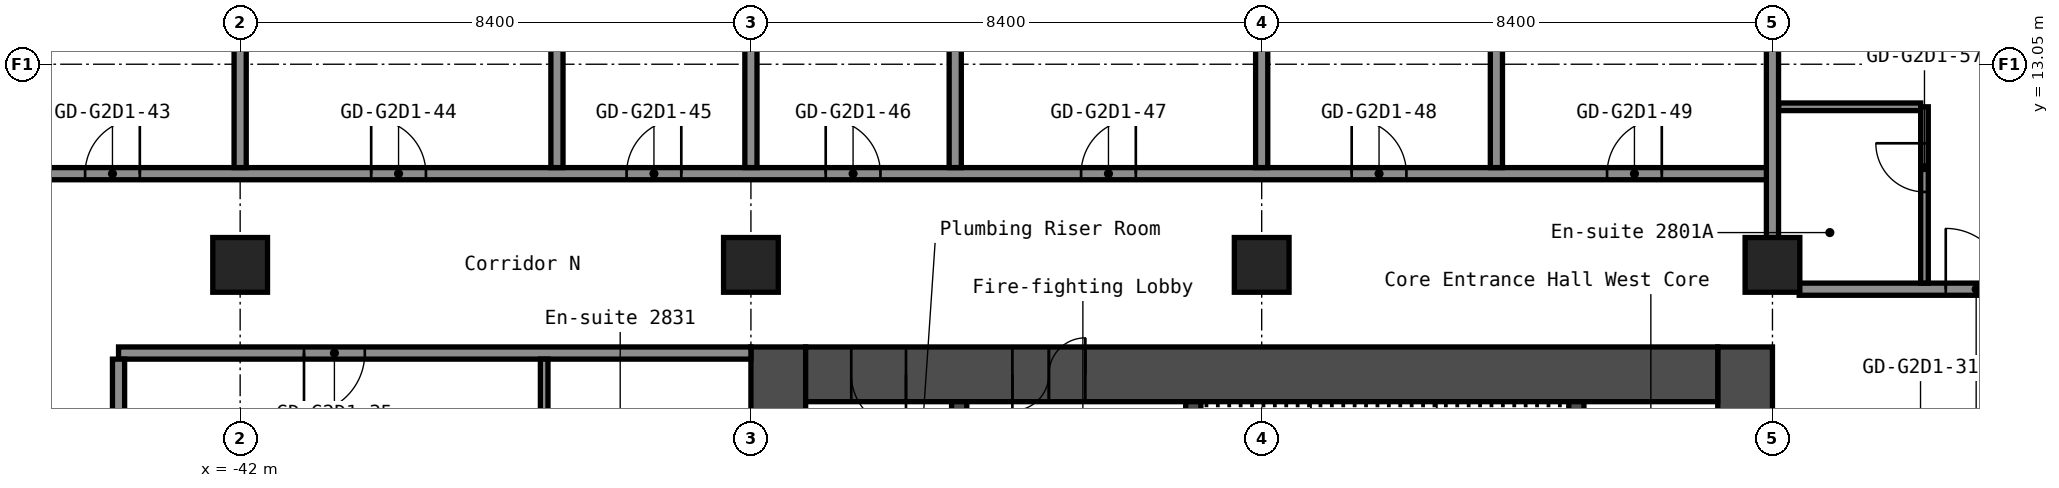
"""IFC4 building model, lengths in metres.
Left out: names, types, materials, properties, quantities, classifications, styles, units other than length and angle.
Written with IfcOpenShell. Run it as: python <this file> out.ifc"""

import sys

from ifc_helpers import new_model, si_unit, direction, frame, frame_2d, origin, origin_2d, place, context, subcontext, project, spatial, rectangle, hollow_rectangle, extrude, element, fill, save


model = new_model("IFC4")
c1 = context("Model", 3, precision=1e-05, world=origin(), true_north=direction((0.0, 1.0)))
c2 = subcontext(c1, "Body", "Model", "MODEL_VIEW")
j1 = project(units=[si_unit("LENGTHUNIT", "METRE"), si_unit("PLANEANGLEUNIT", "RADIAN")], contexts=[c1])
p1 = place(None, origin())
s1 = spatial("IfcSite", under=j1, at=p1, CompositionType="ELEMENT")
p2 = place(p1, origin())
s2 = spatial("IfcBuilding", under=s1, at=p2, CompositionType="ELEMENT")
p3 = place(p2, frame((0.0, 0.0, 101.0)))
s3 = spatial("IfcBuildingStorey", under=s2, at=p3, CompositionType="ELEMENT", Elevation=101.0)
for number, where, z_axis, x_axis in (
    (1, (-42.0, 9.75, 0.0), (0.0, 0.0, 1.0), (1.0, 0.0, 0.0)),
    (2, (-33.6, 9.75, 0.0), (0.0, 0.0, 1.0), (1.0, 0.0, 0.0)),
    (3, (-25.2, 9.75, 0.0), (0.0, 0.0, 1.0), (1.0, 0.0, 0.0)),
    (4, (-16.8, 9.75, 0.0), (0.0, 0.0, 1.0), (1.0, 0.0, 0.0)),
):
    element("IfcColumn", number, at=place(p3, frame(where, z_axis=z_axis, x_axis=x_axis)), inside=s3, PredefinedType="COLUMN", context=c2, shape_type="SweptSolid", body=[
        extrude(hollow_rectangle(XDim=0.9, YDim=0.9, WallThickness=0.036, at=origin_2d()), origin(), (0.0, 0.0, 1.0), 2.8),
    ])
p4 = place(p3, frame((-17.25, -8.4, 0.0), z_axis=(0.0, 0.0, 1.0), x_axis=(0.0, 1.0, 0.0)))
e5 = element("IfcWall", 5, at=p4, inside=s3, PredefinedType="SHEAR", context=c2, shape_type="SweptSolid", body=[
    extrude(rectangle(XDim=16.8, YDim=0.9, at=frame_2d((8.4, 0.0))), origin(), (0.0, 0.0, 1.0), 2.8),
])
p5 = place(p4, frame((7.6, 0.0, 0.0)))
e6 = element("IfcOpeningElement", 6, at=p5, cuts=e5, PredefinedType="OPENING", context=c2, shape_type="SweptSolid", body=[
    extrude(rectangle(XDim=1.2, YDim=2.1, at=frame_2d((0.6, 1.05))), frame((0.0, 0.46, 0.0), z_axis=(0.0, -1.0, 0.0), x_axis=(1.0, 0.0, 0.0)), (0.0, 0.0, 1.0), 0.92),
])
p6 = place(p3, frame((-33.15, -8.4, 0.0), z_axis=(0.0, 0.0, 1.0), x_axis=(0.0, 1.0, 0.0)))
e7 = element("IfcWall", 7, at=p6, inside=s3, PredefinedType="SHEAR", context=c2, shape_type="SweptSolid", body=[
    extrude(rectangle(XDim=16.8, YDim=0.9, at=frame_2d((8.4, 0.0))), origin(), (0.0, 0.0, 1.0), 2.8),
])
p7 = place(p3, frame((-32.7, 7.95, 0.0), z_axis=(0.0, 0.0, 1.0), x_axis=(1.0, 0.0, 0.0)))
e8 = element("IfcWall", 8, at=p7, inside=s3, PredefinedType="SHEAR", context=c2, shape_type="SweptSolid", body=[
    extrude(rectangle(XDim=15.0, YDim=0.9, at=frame_2d((7.5, 0.0))), origin(), (0.0, 0.0, 1.0), 2.8),
])
p8 = place(p7, frame((3.4, 0.0, 0.0)))
e9 = element("IfcOpeningElement", 9, at=p8, cuts=e8, PredefinedType="OPENING", context=c2, shape_type="SweptSolid", body=[
    extrude(rectangle(XDim=1.2, YDim=2.1, at=frame_2d((0.6, 1.05))), frame((0.0, 0.46, 0.0), z_axis=(0.0, -1.0, 0.0), x_axis=(1.0, 0.0, 0.0)), (0.0, 0.0, 1.0), 0.92),
])
p9 = place(p7, frame((0.75, 0.0, 0.0)))
e10 = element("IfcOpeningElement", 10, at=p9, cuts=e8, PredefinedType="OPENING", context=c2, shape_type="SweptSolid", body=[
    extrude(rectangle(XDim=0.9, YDim=2.1, at=frame_2d((0.45, 1.05))), frame((0.0, 0.46, 0.0), z_axis=(0.0, -1.0, 0.0), x_axis=(1.0, 0.0, 0.0)), (0.0, 0.0, 1.0), 0.92),
])
p10 = place(p3, frame((-20.025, 1.2, 0.0), z_axis=(0.0, 0.0, 1.0), x_axis=(0.0, 1.0, 0.0)))
e11 = element("IfcWall", 11, at=p10, inside=s3, PredefinedType="SHEAR", context=c2, shape_type="SweptSolid", body=[
    extrude(rectangle(XDim=6.3, YDim=0.25, at=frame_2d((3.15, 0.0))), origin(), (0.0, 0.0, 1.0), 2.8),
])
p11 = place(p3, frame((-26.325, 3.75, 0.0), z_axis=(0.0, 0.0, 1.0), x_axis=(0.0, 1.0, 0.0)))
e12 = element("IfcWall", 12, at=p11, inside=s3, PredefinedType="SHEAR", context=c2, shape_type="SweptSolid", body=[
    extrude(rectangle(XDim=3.75, YDim=0.25, at=frame_2d((1.875, 0.0))), origin(), (0.0, 0.0, 1.0), 2.8),
])
p12 = place(p11, frame((1.25, 0.0, 0.0)))
e13 = element("IfcOpeningElement", 13, at=p12, cuts=e12, PredefinedType="OPENING", context=c2, shape_type="SweptSolid", body=[
    extrude(rectangle(XDim=1.2, YDim=2.1, at=frame_2d((0.6, 1.05))), frame((0.0, 0.135, 0.0), z_axis=(0.0, -1.0, 0.0), x_axis=(1.0, 0.0, 0.0)), (0.0, 0.0, 1.0), 0.27),
])
p13 = place(p3, frame((-30.175, 1.45, 0.0), z_axis=(0.0, 0.0, 1.0), x_axis=(0.0, 1.0, 0.0)))
e14 = element("IfcWall", 14, at=p13, inside=s3, PredefinedType="SHEAR", context=c2, shape_type="SweptSolid", body=[
    extrude(rectangle(XDim=6.05, YDim=0.25, at=frame_2d((3.025, 0.0))), origin(), (0.0, 0.0, 1.0), 2.8),
])
p14 = place(p13, frame((2.625, 0.0, 0.0)))
e15 = element("IfcOpeningElement", 15, at=p14, cuts=e14, PredefinedType="OPENING", context=c2, shape_type="SweptSolid", body=[
    extrude(rectangle(XDim=1.1, YDim=2.1, at=frame_2d((0.55, 1.05))), frame((0.0, 0.135, 0.0), z_axis=(0.0, -1.0, 0.0), x_axis=(1.0, 0.0, 0.0)), (0.0, 0.0, 1.0), 0.27),
])
p15 = place(p3, frame((-44.0, 8.3, 0.0), z_axis=(0.0, 0.0, 1.0), x_axis=(1.0, 0.0, 0.0)))
e16 = element("IfcWall", 16, at=p15, inside=s3, PredefinedType="PARTITIONING", context=c2, shape_type="SweptSolid", body=[
    extrude(rectangle(XDim=10.4, YDim=0.2, at=frame_2d((5.2, 0.0))), origin(), (0.0, 0.0, 1.0), 2.8),
])
p16 = place(p15, frame((3.05, 0.0, 0.0)))
e17 = element("IfcOpeningElement", 17, at=p16, cuts=e16, PredefinedType="OPENING", context=c2, shape_type="SweptSolid", body=[
    extrude(rectangle(XDim=1.0, YDim=2.1, at=frame_2d((0.5, 1.05))), frame((0.0, 0.11, 0.0), z_axis=(0.0, -1.0, 0.0), x_axis=(1.0, 0.0, 0.0)), (0.0, 0.0, 1.0), 0.22),
])
p17 = place(p3, frame((-16.36, 9.35, 0.0), z_axis=(0.0, 0.0, 1.0), x_axis=(1.0, 0.0, 0.0)))
e18 = element("IfcWall", 18, at=p17, inside=s3, PredefinedType="PARTITIONING", context=c2, shape_type="SweptSolid", body=[
    extrude(rectangle(XDim=32.72, YDim=0.2, at=frame_2d((16.36, 0.0))), origin(), (0.0, 0.0, 1.0), 2.8),
])
p18 = place(p17, frame((2.41, 0.0, 0.0)))
e19 = element("IfcOpeningElement", 19, at=p18, cuts=e18, PredefinedType="OPENING", context=c2, shape_type="SweptSolid", body=[
    extrude(rectangle(XDim=1.0, YDim=2.1, at=frame_2d((0.5, 1.05))), frame((0.0, 0.11, 0.0), z_axis=(0.0, -1.0, 0.0), x_axis=(1.0, 0.0, 0.0)), (0.0, 0.0, 1.0), 0.22),
])
p19 = place(p17, frame((4.11, 0.0, 0.0)))
e20 = element("IfcOpeningElement", 20, at=p19, cuts=e18, PredefinedType="OPENING", context=c2, shape_type="SweptSolid", body=[
    extrude(rectangle(XDim=1.0, YDim=2.1, at=frame_2d((0.5, 1.05))), frame((0.0, 0.11, 0.0), z_axis=(0.0, -1.0, 0.0), x_axis=(1.0, 0.0, 0.0)), (0.0, 0.0, 1.0), 0.22),
])
p20 = place(p17, frame((13.36, 0.0, 0.0)))
e21 = element("IfcOpeningElement", 21, at=p20, cuts=e18, PredefinedType="OPENING", context=c2, shape_type="SweptSolid", body=[
    extrude(rectangle(XDim=1.0, YDim=2.1, at=frame_2d((0.5, 1.05))), frame((0.0, 0.11, 0.0), z_axis=(0.0, -1.0, 0.0), x_axis=(1.0, 0.0, 0.0)), (0.0, 0.0, 1.0), 0.22),
])
p21 = place(p17, frame((19.21, 0.0, 0.0)))
e22 = element("IfcOpeningElement", 22, at=p21, cuts=e18, PredefinedType="OPENING", context=c2, shape_type="SweptSolid", body=[
    extrude(rectangle(XDim=1.0, YDim=2.1, at=frame_2d((0.5, 1.05))), frame((0.0, 0.11, 0.0), z_axis=(0.0, -1.0, 0.0), x_axis=(1.0, 0.0, 0.0)), (0.0, 0.0, 1.0), 0.22),
])
p22 = place(p17, frame((20.91, 0.0, 0.0)))
e23 = element("IfcOpeningElement", 23, at=p22, cuts=e18, PredefinedType="OPENING", context=c2, shape_type="SweptSolid", body=[
    extrude(rectangle(XDim=1.0, YDim=2.1, at=frame_2d((0.5, 1.05))), frame((0.0, 0.11, 0.0), z_axis=(0.0, -1.0, 0.0), x_axis=(1.0, 0.0, 0.0)), (0.0, 0.0, 1.0), 0.22),
])
p23 = place(p17, frame((26.76, 0.0, 0.0)))
e24 = element("IfcOpeningElement", 24, at=p23, cuts=e18, PredefinedType="OPENING", context=c2, shape_type="SweptSolid", body=[
    extrude(rectangle(XDim=1.0, YDim=2.1, at=frame_2d((0.5, 1.05))), frame((0.0, 0.11, 0.0), z_axis=(0.0, -1.0, 0.0), x_axis=(1.0, 0.0, 0.0)), (0.0, 0.0, 1.0), 0.22),
])
p24 = place(p3, frame((-46.5, 11.25, 0.0), z_axis=(0.0, 0.0, 1.0), x_axis=(1.0, 0.0, 0.0)))
e25 = element("IfcWall", 25, at=p24, inside=s3, PredefinedType="PARTITIONING", context=c2, shape_type="SweptSolid", body=[
    extrude(rectangle(XDim=29.7, YDim=0.2, at=frame_2d((14.85, 0.0))), origin(), (0.0, 0.0, 1.0), 2.8),
])
p25 = place(p24, frame((1.95, 0.0, 0.0)))
e26 = element("IfcOpeningElement", 26, at=p25, cuts=e25, PredefinedType="OPENING", context=c2, shape_type="SweptSolid", body=[
    extrude(rectangle(XDim=0.9, YDim=2.1, at=frame_2d((0.45, 1.05))), frame((0.0, 0.11, 0.0), z_axis=(0.0, -1.0, 0.0), x_axis=(1.0, 0.0, 0.0)), (0.0, 0.0, 1.0), 0.22),
])
p26 = place(p24, frame((6.655, 0.0, 0.0)))
e27 = element("IfcOpeningElement", 27, at=p26, cuts=e25, PredefinedType="OPENING", context=c2, shape_type="SweptSolid", body=[
    extrude(rectangle(XDim=0.9, YDim=2.1, at=frame_2d((0.45, 1.05))), frame((0.0, 0.11, 0.0), z_axis=(0.0, -1.0, 0.0), x_axis=(1.0, 0.0, 0.0)), (0.0, 0.0, 1.0), 0.22),
])
p27 = place(p24, frame((10.855, 0.0, 0.0)))
e28 = element("IfcOpeningElement", 28, at=p27, cuts=e25, PredefinedType="OPENING", context=c2, shape_type="SweptSolid", body=[
    extrude(rectangle(XDim=0.9, YDim=2.1, at=frame_2d((0.45, 1.05))), frame((0.0, 0.11, 0.0), z_axis=(0.0, -1.0, 0.0), x_axis=(1.0, 0.0, 0.0)), (0.0, 0.0, 1.0), 0.22),
])
p28 = place(p24, frame((14.13, 0.0, 0.0)))
e29 = element("IfcOpeningElement", 29, at=p28, cuts=e25, PredefinedType="OPENING", context=c2, shape_type="SweptSolid", body=[
    extrude(rectangle(XDim=0.9, YDim=2.1, at=frame_2d((0.45, 1.05))), frame((0.0, 0.11, 0.0), z_axis=(0.0, -1.0, 0.0), x_axis=(1.0, 0.0, 0.0)), (0.0, 0.0, 1.0), 0.22),
])
p29 = place(p24, frame((18.33, 0.0, 0.0)))
e30 = element("IfcOpeningElement", 30, at=p29, cuts=e25, PredefinedType="OPENING", context=c2, shape_type="SweptSolid", body=[
    extrude(rectangle(XDim=0.9, YDim=2.1, at=frame_2d((0.45, 1.05))), frame((0.0, 0.11, 0.0), z_axis=(0.0, -1.0, 0.0), x_axis=(1.0, 0.0, 0.0)), (0.0, 0.0, 1.0), 0.22),
])
p30 = place(p24, frame((22.78, 0.0, 0.0)))
e31 = element("IfcOpeningElement", 31, at=p30, cuts=e25, PredefinedType="OPENING", context=c2, shape_type="SweptSolid", body=[
    extrude(rectangle(XDim=0.9, YDim=2.1, at=frame_2d((0.45, 1.05))), frame((0.0, 0.11, 0.0), z_axis=(0.0, -1.0, 0.0), x_axis=(1.0, 0.0, 0.0)), (0.0, 0.0, 1.0), 0.22),
])
p31 = place(p24, frame((26.98, 0.0, 0.0)))
e32 = element("IfcOpeningElement", 32, at=p31, cuts=e25, PredefinedType="OPENING", context=c2, shape_type="SweptSolid", body=[
    extrude(rectangle(XDim=0.9, YDim=2.1, at=frame_2d((0.45, 1.05))), frame((0.0, 0.11, 0.0), z_axis=(0.0, -1.0, 0.0), x_axis=(1.0, 0.0, 0.0)), (0.0, 0.0, 1.0), 0.22),
])
p32 = place(p3, frame((-16.7, 12.35, 0.0), z_axis=(0.0, 0.0, 1.0), x_axis=(1.0, 0.0, 0.0)))
e33 = element("IfcWall", 33, at=p32, inside=s3, PredefinedType="PARTITIONING", context=c2, shape_type="SweptSolid", body=[
    extrude(rectangle(XDim=2.337, YDim=0.125, at=frame_2d((1.169, 0.0))), origin(), (0.0, 0.0, 1.0), 2.8),
])
p33 = place(p3, frame((-44.0, -8.2, 0.0), z_axis=(0.0, 0.0, 1.0), x_axis=(0.0, 1.0, 0.0)))
e34 = element("IfcWall", 34, at=p33, inside=s3, PredefinedType="PARTITIONING", context=c2, shape_type="SweptSolid", body=[
    extrude(rectangle(XDim=16.4, YDim=0.2, at=frame_2d((8.2, 0.0))), origin(), (0.0, 0.0, 1.0), 2.8),
])
p34 = place(p3, frame((-42.0, 11.35, 0.0), z_axis=(0.0, 0.0, 1.0), x_axis=(0.0, 1.0, 0.0)))
e35 = element("IfcWall", 35, at=p34, inside=s3, PredefinedType="PARTITIONING", context=c2, shape_type="SweptSolid", body=[
    extrude(rectangle(XDim=12.2, YDim=0.2, at=frame_2d((6.1, 0.0))), origin(), (0.0, 0.0, 1.0), 2.8),
])
p35 = place(p3, frame((-37.0, 4.9, 0.0), z_axis=(0.0, 0.0, 1.0), x_axis=(0.0, 1.0, 0.0)))
e36 = element("IfcWall", 36, at=p35, inside=s3, PredefinedType="PARTITIONING", context=c2, shape_type="SweptSolid", body=[
    extrude(rectangle(XDim=3.3, YDim=0.125, at=frame_2d((1.65, 0.0))), origin(), (0.0, 0.0, 1.0), 2.8),
])
for number, where, z_axis, x_axis in (
    (37, (-36.79, 11.35, 0.0), (0.0, 0.0, 1.0), (0.0, 1.0, 0.0)),
    (38, (-33.6, 11.35, 0.0), (0.0, 0.0, 1.0), (0.0, 1.0, 0.0)),
    (39, (-30.24, 11.35, 0.0), (0.0, 0.0, 1.0), (0.0, 1.0, 0.0)),
    (40, (-25.2, 11.35, 0.0), (0.0, 0.0, 1.0), (0.0, 1.0, 0.0)),
    (41, (-21.34, 11.35, 0.0), (0.0, 0.0, 1.0), (0.0, 1.0, 0.0)),
):
    element("IfcWall", number, at=place(p3, frame(where, z_axis=z_axis, x_axis=x_axis)), inside=s3, PredefinedType="PARTITIONING", context=c2, shape_type="SweptSolid", body=[
        extrude(rectangle(XDim=12.2, YDim=0.2, at=frame_2d((6.1, 0.0))), origin(), (0.0, 0.0, 1.0), 2.8),
    ])
p36 = place(p3, frame((-16.8, 10.19, 0.0), z_axis=(0.0, 0.0, 1.0), x_axis=(0.0, 1.0, 0.0)))
e42 = element("IfcWall", 42, at=p36, inside=s3, PredefinedType="PARTITIONING", context=c2, shape_type="SweptSolid", body=[
    extrude(rectangle(XDim=13.36, YDim=0.2, at=frame_2d((6.68, 0.0))), origin(), (0.0, 0.0, 1.0), 2.8),
])
p37 = place(p3, frame((-14.3, 9.45, 0.0), z_axis=(0.0, 0.0, 1.0), x_axis=(0.0, 1.0, 0.0)))
e43 = element("IfcWall", 43, at=p37, inside=s3, PredefinedType="PARTITIONING", context=c2, shape_type="SweptSolid", body=[
    extrude(rectangle(XDim=2.9, YDim=0.125, at=frame_2d((1.45, 0.0))), origin(), (0.0, 0.0, 1.0), 2.8),
])
p38 = place(p37, frame((1.5, 0.0, 0.0)))
e44 = element("IfcOpeningElement", 44, at=p38, cuts=e43, PredefinedType="OPENING", context=c2, shape_type="SweptSolid", body=[
    extrude(rectangle(XDim=0.8, YDim=2.1, at=frame_2d((0.4, 1.05))), frame((0.0, 0.073, 0.0), z_axis=(0.0, -1.0, 0.0), x_axis=(1.0, 0.0, 0.0)), (0.0, 0.0, 1.0), 0.145),
])
p39 = place(p8, origin())
e45 = element("IfcDoor", 45, at=p39, inside=s3, OperationType="DOUBLE_DOOR_SINGLE_SWING", PredefinedType="DOOR", context=c2, shape_type="SweptSolid", body=[
    extrude(rectangle(XDim=1.2, YDim=2.1, at=frame_2d((0.6, 1.05))), frame((0.0, 0.025, 0.0), z_axis=(0.0, -1.0, 0.0), x_axis=(1.0, 0.0, 0.0)), (0.0, 0.0, 1.0), 0.05),
])
fill(e9, e45)
p40 = place(p9, origin())
e46 = element("IfcDoor", 46, at=p40, inside=s3, OperationType="SINGLE_SWING_RIGHT", PredefinedType="DOOR", context=c2, shape_type="SweptSolid", body=[
    extrude(rectangle(XDim=0.9, YDim=2.1, at=frame_2d((0.45, 1.05))), frame((0.0, 0.025, 0.0), z_axis=(0.0, -1.0, 0.0), x_axis=(1.0, 0.0, 0.0)), (0.0, 0.0, 1.0), 0.05),
])
fill(e10, e46)
p41 = place(p16, origin())
e47 = element("IfcDoor", 47, at=p41, inside=s3, OperationType="SINGLE_SWING_LEFT", PredefinedType="DOOR", context=c2, shape_type="SweptSolid", body=[
    extrude(rectangle(XDim=1.0, YDim=2.1, at=frame_2d((0.5, 1.05))), frame((0.0, 0.025, 0.0), z_axis=(0.0, -1.0, 0.0), x_axis=(1.0, 0.0, 0.0)), (0.0, 0.0, 1.0), 0.05),
])
fill(e17, e47)
p42 = place(p18, origin())
e48 = element("IfcDoor", 48, at=p42, inside=s3, OperationType="SINGLE_SWING_RIGHT", PredefinedType="DOOR", context=c2, shape_type="SweptSolid", body=[
    extrude(rectangle(XDim=1.0, YDim=2.1, at=frame_2d((0.5, 1.05))), frame((0.0, 0.025, 0.0), z_axis=(0.0, -1.0, 0.0), x_axis=(1.0, 0.0, 0.0)), (0.0, 0.0, 1.0), 0.05),
])
fill(e19, e48)
p43 = place(p25, origin())
e49 = element("IfcDoor", 49, at=p43, inside=s3, OperationType="SINGLE_SWING_LEFT", PredefinedType="DOOR", context=c2, shape_type="SweptSolid", body=[
    extrude(rectangle(XDim=0.9, YDim=2.1, at=frame_2d((0.45, 1.05))), frame((0.0, 0.025, 0.0), z_axis=(0.0, -1.0, 0.0), x_axis=(1.0, 0.0, 0.0)), (0.0, 0.0, 1.0), 0.05),
])
fill(e26, e49)
p44 = place(p26, origin())
e50 = element("IfcDoor", 50, at=p44, inside=s3, OperationType="SINGLE_SWING_RIGHT", PredefinedType="DOOR", context=c2, shape_type="SweptSolid", body=[
    extrude(rectangle(XDim=0.9, YDim=2.1, at=frame_2d((0.45, 1.05))), frame((0.0, 0.025, 0.0), z_axis=(0.0, -1.0, 0.0), x_axis=(1.0, 0.0, 0.0)), (0.0, 0.0, 1.0), 0.05),
])
fill(e27, e50)
p45 = place(p27, origin())
e51 = element("IfcDoor", 51, at=p45, inside=s3, OperationType="SINGLE_SWING_LEFT", PredefinedType="DOOR", context=c2, shape_type="SweptSolid", body=[
    extrude(rectangle(XDim=0.9, YDim=2.1, at=frame_2d((0.45, 1.05))), frame((0.0, 0.025, 0.0), z_axis=(0.0, -1.0, 0.0), x_axis=(1.0, 0.0, 0.0)), (0.0, 0.0, 1.0), 0.05),
])
fill(e28, e51)
p46 = place(p28, origin())
e52 = element("IfcDoor", 52, at=p46, inside=s3, OperationType="SINGLE_SWING_RIGHT", PredefinedType="DOOR", context=c2, shape_type="SweptSolid", body=[
    extrude(rectangle(XDim=0.9, YDim=2.1, at=frame_2d((0.45, 1.05))), frame((0.0, 0.025, 0.0), z_axis=(0.0, -1.0, 0.0), x_axis=(1.0, 0.0, 0.0)), (0.0, 0.0, 1.0), 0.05),
])
fill(e29, e52)
p47 = place(p29, origin())
e53 = element("IfcDoor", 53, at=p47, inside=s3, OperationType="SINGLE_SWING_LEFT", PredefinedType="DOOR", context=c2, shape_type="SweptSolid", body=[
    extrude(rectangle(XDim=0.9, YDim=2.1, at=frame_2d((0.45, 1.05))), frame((0.0, 0.025, 0.0), z_axis=(0.0, -1.0, 0.0), x_axis=(1.0, 0.0, 0.0)), (0.0, 0.0, 1.0), 0.05),
])
fill(e30, e53)
p48 = place(p30, origin())
e54 = element("IfcDoor", 54, at=p48, inside=s3, OperationType="SINGLE_SWING_RIGHT", PredefinedType="DOOR", context=c2, shape_type="SweptSolid", body=[
    extrude(rectangle(XDim=0.9, YDim=2.1, at=frame_2d((0.45, 1.05))), frame((0.0, 0.025, 0.0), z_axis=(0.0, -1.0, 0.0), x_axis=(1.0, 0.0, 0.0)), (0.0, 0.0, 1.0), 0.05),
])
fill(e31, e54)
p49 = place(p31, origin())
e55 = element("IfcDoor", 55, at=p49, inside=s3, OperationType="SINGLE_SWING_LEFT", PredefinedType="DOOR", context=c2, shape_type="SweptSolid", body=[
    extrude(rectangle(XDim=0.9, YDim=2.1, at=frame_2d((0.45, 1.05))), frame((0.0, 0.025, 0.0), z_axis=(0.0, -1.0, 0.0), x_axis=(1.0, 0.0, 0.0)), (0.0, 0.0, 1.0), 0.05),
])
fill(e32, e55)
p50 = place(p38, origin())
e56 = element("IfcDoor", 56, at=p50, inside=s3, OperationType="SINGLE_SWING_LEFT", PredefinedType="DOOR", context=c2, shape_type="SweptSolid", body=[
    extrude(rectangle(XDim=0.8, YDim=2.1, at=frame_2d((0.4, 1.05))), frame((0.0, 0.025, 0.0), z_axis=(0.0, -1.0, 0.0), x_axis=(1.0, 0.0, 0.0)), (0.0, 0.0, 1.0), 0.05),
])
fill(e44, e56)
save(model, sys.argv[1])
